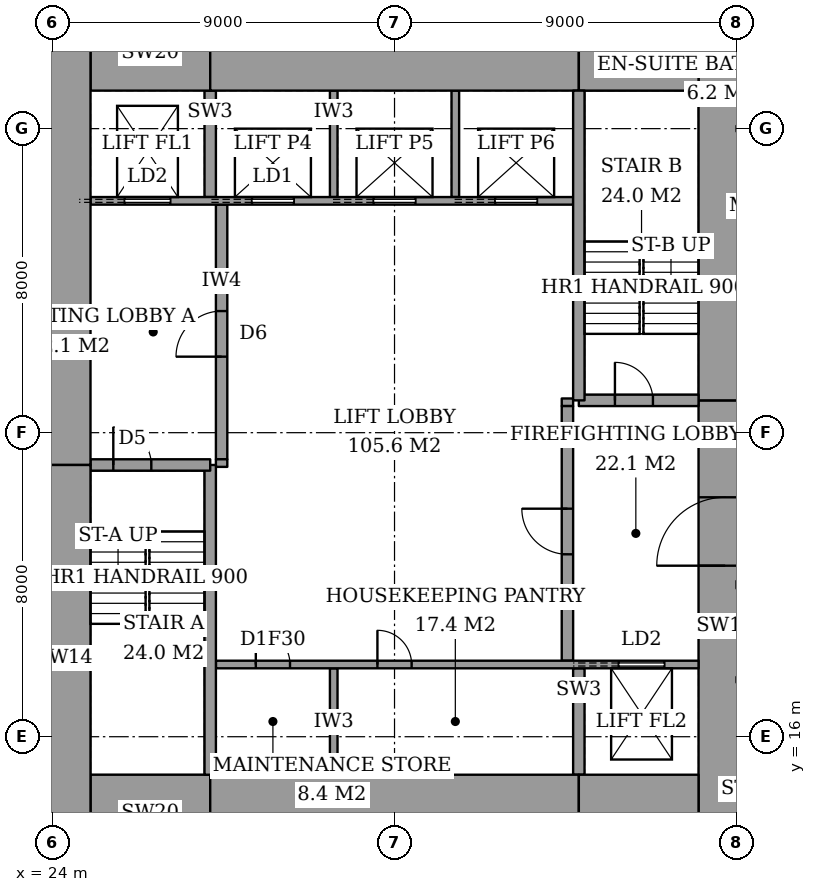
"""IFC4 building model, lengths in metres.
Left out: names, types, materials, properties, quantities, classifications, styles, units other than length and angle.
Written with IfcOpenShell. Run it as: python <this file> out.ifc"""

import sys

from ifc_helpers import new_model, si_unit, direction, frame, frame_2d, origin, place, context, subcontext, project, spatial, rectangle, extrude, element, fill, save


model = new_model("IFC4")
c1 = context("Model", 3, precision=1e-05, world=origin(), true_north=direction((0.0, 1.0)))
c2 = subcontext(c1, "Body", "Model", "MODEL_VIEW")
j1 = project(units=[si_unit("LENGTHUNIT", "METRE"), si_unit("PLANEANGLEUNIT", "RADIAN")], contexts=[c1])
p1 = place(None, origin())
s1 = spatial("IfcSite", under=j1, at=p1, CompositionType="ELEMENT")
p2 = place(p1, origin())
s2 = spatial("IfcBuilding", under=s1, at=p2, CompositionType="ELEMENT")
p3 = place(p2, frame((0.0, 0.0, 237.6)))
s3 = spatial("IfcBuildingStorey", under=s2, at=p3, CompositionType="ELEMENT", Elevation=237.6)
p4 = place(p3, frame((25.0, 14.0, 0.0), z_axis=(0.0, 0.0, 1.0), x_axis=(1.0, 0.0, 0.0)))
e1 = element("IfcWall", 1, at=p4, inside=s3, PredefinedType="SHEAR", context=c2, shape_type="SweptSolid", body=[
    extrude(rectangle(XDim=3.15, YDim=2.0, at=frame_2d((1.575, 0.0))), origin(), (0.0, 0.0, 1.0), 3.6),
])
p5 = place(p3, frame((28.15, 14.0, 0.0), z_axis=(0.0, 0.0, 1.0), x_axis=(1.0, 0.0, 0.0)))
e2 = element("IfcWall", 2, at=p5, inside=s3, PredefinedType="SHEAR", context=c2, shape_type="SweptSolid", body=[
    extrude(rectangle(XDim=9.7, YDim=2.0, at=frame_2d((4.85, 0.0))), origin(), (0.0, 0.0, 1.0), 3.6),
])
for number, where, z_axis, x_axis in (
    (3, (37.85, 14.0, 0.0), (0.0, 0.0, 1.0), (1.0, 0.0, 0.0)),
    (4, (25.0, 34.0, 0.0), (0.0, 0.0, 1.0), (1.0, 0.0, 0.0)),
):
    element("IfcWall", number, at=place(p3, frame(where, z_axis=z_axis, x_axis=x_axis)), inside=s3, PredefinedType="SHEAR", context=c2, shape_type="SweptSolid", body=[
        extrude(rectangle(XDim=3.15, YDim=2.0, at=frame_2d((1.575, 0.0))), origin(), (0.0, 0.0, 1.0), 3.6),
    ])
p6 = place(p3, frame((28.15, 34.0, 0.0), z_axis=(0.0, 0.0, 1.0), x_axis=(1.0, 0.0, 0.0)))
e5 = element("IfcWall", 5, at=p6, inside=s3, PredefinedType="SHEAR", context=c2, shape_type="SweptSolid", body=[
    extrude(rectangle(XDim=9.7, YDim=2.0, at=frame_2d((4.85, 0.0))), origin(), (0.0, 0.0, 1.0), 3.6),
])
p7 = place(p3, frame((37.85, 34.0, 0.0), z_axis=(0.0, 0.0, 1.0), x_axis=(1.0, 0.0, 0.0)))
e6 = element("IfcWall", 6, at=p7, inside=s3, PredefinedType="SHEAR", context=c2, shape_type="SweptSolid", body=[
    extrude(rectangle(XDim=3.15, YDim=2.0, at=frame_2d((1.575, 0.0))), origin(), (0.0, 0.0, 1.0), 3.6),
])
p8 = place(p3, frame((24.3, 13.0, 0.0), z_axis=(0.0, 0.0, 1.0), x_axis=(0.0, 1.0, 0.0)))
e7 = element("IfcWall", 7, at=p8, inside=s3, PredefinedType="SHEAR", context=c2, shape_type="SweptSolid", body=[
    extrude(rectangle(XDim=10.15, YDim=1.4, at=frame_2d((5.075, 0.0))), origin(), (0.0, 0.0, 1.0), 3.6),
])
p9 = place(p3, frame((24.3, 23.15, 0.0), z_axis=(0.0, 0.0, 1.0), x_axis=(0.0, 1.0, 0.0)))
e8 = element("IfcWall", 8, at=p9, inside=s3, PredefinedType="SHEAR", context=c2, shape_type="SweptSolid", body=[
    extrude(rectangle(XDim=11.85, YDim=1.4, at=frame_2d((5.925, 0.0))), origin(), (0.0, 0.0, 1.0), 3.6),
])
p10 = place(p3, frame((41.7, 13.0, 0.0), z_axis=(0.0, 0.0, 1.0), x_axis=(0.0, 1.0, 0.0)))
e9 = element("IfcWall", 9, at=p10, inside=s3, PredefinedType="SHEAR", context=c2, shape_type="SweptSolid", body=[
    extrude(rectangle(XDim=11.85, YDim=1.4, at=frame_2d((5.925, 0.0))), origin(), (0.0, 0.0, 1.0), 3.6),
])
p11 = place(p10, frame((7.5, 0.0, 0.0)))
e10 = element("IfcOpeningElement", 10, at=p11, cuts=e9, PredefinedType="OPENING", context=c2, shape_type="SweptSolid", body=[
    extrude(rectangle(XDim=1.8, YDim=2.4, at=frame_2d((0.9, 1.2))), frame((0.0, 0.71, 0.0), z_axis=(0.0, -1.0, 0.0), x_axis=(1.0, 0.0, 0.0)), (0.0, 0.0, 1.0), 1.42),
])
p12 = place(p3, frame((41.7, 24.85, 0.0), z_axis=(0.0, 0.0, 1.0), x_axis=(0.0, 1.0, 0.0)))
e11 = element("IfcWall", 11, at=p12, inside=s3, PredefinedType="SHEAR", context=c2, shape_type="SweptSolid", body=[
    extrude(rectangle(XDim=10.15, YDim=1.4, at=frame_2d((5.075, 0.0))), origin(), (0.0, 0.0, 1.0), 3.6),
])
p13 = place(p3, frame((28.15, 15.0, 0.0), z_axis=(0.0, 0.0, 1.0), x_axis=(0.0, 1.0, 0.0)))
e12 = element("IfcWall", 12, at=p13, inside=s3, PredefinedType="SHEAR", context=c2, shape_type="SweptSolid", body=[
    extrude(rectangle(XDim=8.15, YDim=0.3, at=frame_2d((4.075, 0.0))), origin(), (0.0, 0.0, 1.0), 3.6),
])
p14 = place(p3, frame((25.0, 23.15, 0.0), z_axis=(0.0, 0.0, 1.0), x_axis=(1.0, 0.0, 0.0)))
e13 = element("IfcWall", 13, at=p14, inside=s3, PredefinedType="SHEAR", context=c2, shape_type="SweptSolid", body=[
    extrude(rectangle(XDim=3.15, YDim=0.3, at=frame_2d((1.575, 0.0))), origin(), (0.0, 0.0, 1.0), 3.6),
])
p15 = place(p14, frame((0.6, 0.0, 0.0)))
e14 = element("IfcOpeningElement", 14, at=p15, cuts=e13, PredefinedType="OPENING", context=c2, shape_type="SweptSolid", body=[
    extrude(rectangle(XDim=1.0, YDim=2.1, at=frame_2d((0.5, 1.05))), frame((0.0, 0.16, 0.0), z_axis=(0.0, -1.0, 0.0), x_axis=(1.0, 0.0, 0.0)), (0.0, 0.0, 1.0), 0.32),
])
p16 = place(p3, frame((37.85, 24.85, 0.0), z_axis=(0.0, 0.0, 1.0), x_axis=(0.0, 1.0, 0.0)))
e15 = element("IfcWall", 15, at=p16, inside=s3, PredefinedType="SHEAR", context=c2, shape_type="SweptSolid", body=[
    extrude(rectangle(XDim=8.15, YDim=0.3, at=frame_2d((4.075, 0.0))), origin(), (0.0, 0.0, 1.0), 3.6),
])
p17 = place(p3, frame((37.85, 24.85, 0.0), z_axis=(0.0, 0.0, 1.0), x_axis=(1.0, 0.0, 0.0)))
e16 = element("IfcWall", 16, at=p17, inside=s3, PredefinedType="SHEAR", context=c2, shape_type="SweptSolid", body=[
    extrude(rectangle(XDim=3.15, YDim=0.3, at=frame_2d((1.575, 0.0))), origin(), (0.0, 0.0, 1.0), 3.6),
])
p18 = place(p17, frame((0.95, 0.0, 0.0)))
e17 = element("IfcOpeningElement", 17, at=p18, cuts=e16, PredefinedType="OPENING", context=c2, shape_type="SweptSolid", body=[
    extrude(rectangle(XDim=1.0, YDim=2.1, at=frame_2d((0.5, 1.05))), frame((0.0, 0.16, 0.0), z_axis=(0.0, -1.0, 0.0), x_axis=(1.0, 0.0, 0.0)), (0.0, 0.0, 1.0), 0.32),
])
p19 = place(p3, frame((28.45, 23.3, 0.0), z_axis=(0.0, 0.0, 1.0), x_axis=(0.0, 1.0, 0.0)))
e18 = element("IfcWall", 18, at=p19, inside=s3, PredefinedType="PARTITIONING", context=c2, shape_type="SweptSolid", body=[
    extrude(rectangle(XDim=6.7, YDim=0.3, at=frame_2d((3.35, 0.0))), origin(), (0.0, 0.0, 1.0), 3.6),
])
p20 = place(p19, frame((2.7, 0.0, 0.0)))
e19 = element("IfcOpeningElement", 19, at=p20, cuts=e18, PredefinedType="OPENING", context=c2, shape_type="SweptSolid", body=[
    extrude(rectangle(XDim=1.2, YDim=2.1, at=frame_2d((0.6, 1.05))), frame((0.0, 0.16, 0.0), z_axis=(0.0, -1.0, 0.0), x_axis=(1.0, 0.0, 0.0)), (0.0, 0.0, 1.0), 0.32),
])
p21 = place(p3, frame((37.55, 18.0, 0.0), z_axis=(0.0, 0.0, 1.0), x_axis=(0.0, 1.0, 0.0)))
e20 = element("IfcWall", 20, at=p21, inside=s3, PredefinedType="PARTITIONING", context=c2, shape_type="SweptSolid", body=[
    extrude(rectangle(XDim=6.7, YDim=0.3, at=frame_2d((3.35, 0.0))), origin(), (0.0, 0.0, 1.0), 3.6),
])
p22 = place(p21, frame((2.8, 0.0, 0.0)))
e21 = element("IfcOpeningElement", 21, at=p22, cuts=e20, PredefinedType="OPENING", context=c2, shape_type="SweptSolid", body=[
    extrude(rectangle(XDim=1.2, YDim=2.1, at=frame_2d((0.6, 1.05))), frame((0.0, 0.16, 0.0), z_axis=(0.0, -1.0, 0.0), x_axis=(1.0, 0.0, 0.0)), (0.0, 0.0, 1.0), 0.32),
])
p23 = place(p3, frame((28.3, 17.9, 0.0), z_axis=(0.0, 0.0, 1.0), x_axis=(1.0, 0.0, 0.0)))
e22 = element("IfcWall", 22, at=p23, inside=s3, PredefinedType="PARTITIONING", context=c2, shape_type="SweptSolid", body=[
    extrude(rectangle(XDim=12.7, YDim=0.2, at=frame_2d((6.35, 0.0))), origin(), (0.0, 0.0, 1.0), 3.6),
])
p24 = place(p23, frame((1.05, 0.0, 0.0)))
e23 = element("IfcOpeningElement", 23, at=p24, cuts=e22, PredefinedType="OPENING", context=c2, shape_type="SweptSolid", body=[
    extrude(rectangle(XDim=0.9, YDim=2.1, at=frame_2d((0.45, 1.05))), frame((0.0, 0.11, 0.0), z_axis=(0.0, -1.0, 0.0), x_axis=(1.0, 0.0, 0.0)), (0.0, 0.0, 1.0), 0.22),
])
p25 = place(p23, frame((4.25, 0.0, 0.0)))
e24 = element("IfcOpeningElement", 24, at=p25, cuts=e22, PredefinedType="OPENING", context=c2, shape_type="SweptSolid", body=[
    extrude(rectangle(XDim=0.9, YDim=2.1, at=frame_2d((0.45, 1.05))), frame((0.0, 0.11, 0.0), z_axis=(0.0, -1.0, 0.0), x_axis=(1.0, 0.0, 0.0)), (0.0, 0.0, 1.0), 0.22),
])
p26 = place(p23, frame((10.6, 0.0, 0.0)))
e25 = element("IfcOpeningElement", 25, at=p26, cuts=e22, PredefinedType="OPENING", context=c2, shape_type="SweptSolid", body=[
    extrude(rectangle(XDim=1.2, YDim=2.1, at=frame_2d((0.6, 1.05))), frame((0.0, 0.11, 0.0), z_axis=(0.0, -1.0, 0.0), x_axis=(1.0, 0.0, 0.0)), (0.0, 0.0, 1.0), 0.22),
])
p27 = place(p3, frame((25.0, 30.1, 0.0), z_axis=(0.0, 0.0, 1.0), x_axis=(1.0, 0.0, 0.0)))
e26 = element("IfcWall", 26, at=p27, inside=s3, PredefinedType="PARTITIONING", context=c2, shape_type="SweptSolid", body=[
    extrude(rectangle(XDim=12.7, YDim=0.2, at=frame_2d((6.35, 0.0))), origin(), (0.0, 0.0, 1.0), 3.6),
])
p28 = place(p27, frame((4.25, 0.0, 0.0)))
e27 = element("IfcOpeningElement", 27, at=p28, cuts=e26, PredefinedType="OPENING", context=c2, shape_type="SweptSolid", body=[
    extrude(rectangle(XDim=1.1, YDim=2.1, at=frame_2d((0.55, 1.05))), frame((0.0, 0.11, 0.0), z_axis=(0.0, -1.0, 0.0), x_axis=(1.0, 0.0, 0.0)), (0.0, 0.0, 1.0), 0.22),
])
p29 = place(p27, frame((7.45, 0.0, 0.0)))
e28 = element("IfcOpeningElement", 28, at=p29, cuts=e26, PredefinedType="OPENING", context=c2, shape_type="SweptSolid", body=[
    extrude(rectangle(XDim=1.1, YDim=2.1, at=frame_2d((0.55, 1.05))), frame((0.0, 0.11, 0.0), z_axis=(0.0, -1.0, 0.0), x_axis=(1.0, 0.0, 0.0)), (0.0, 0.0, 1.0), 0.22),
])
p30 = place(p27, frame((10.65, 0.0, 0.0)))
e29 = element("IfcOpeningElement", 29, at=p30, cuts=e26, PredefinedType="OPENING", context=c2, shape_type="SweptSolid", body=[
    extrude(rectangle(XDim=1.1, YDim=2.1, at=frame_2d((0.55, 1.05))), frame((0.0, 0.11, 0.0), z_axis=(0.0, -1.0, 0.0), x_axis=(1.0, 0.0, 0.0)), (0.0, 0.0, 1.0), 0.22),
])
p31 = place(p27, frame((0.9, 0.0, 0.0)))
e30 = element("IfcOpeningElement", 30, at=p31, cuts=e26, PredefinedType="OPENING", context=c2, shape_type="SweptSolid", body=[
    extrude(rectangle(XDim=1.2, YDim=2.1, at=frame_2d((0.6, 1.05))), frame((0.0, 0.11, 0.0), z_axis=(0.0, -1.0, 0.0), x_axis=(1.0, 0.0, 0.0)), (0.0, 0.0, 1.0), 0.22),
])
p32 = place(p3, frame((31.4, 15.0, 0.0), z_axis=(0.0, 0.0, 1.0), x_axis=(0.0, 1.0, 0.0)))
e31 = element("IfcWall", 31, at=p32, inside=s3, PredefinedType="PARTITIONING", context=c2, shape_type="SweptSolid", body=[
    extrude(rectangle(XDim=2.8, YDim=0.2, at=frame_2d((1.4, 0.0))), origin(), (0.0, 0.0, 1.0), 3.6),
])
p33 = place(p3, frame((37.85, 15.0, 0.0), z_axis=(0.0, 0.0, 1.0), x_axis=(0.0, 1.0, 0.0)))
e32 = element("IfcWall", 32, at=p33, inside=s3, PredefinedType="SHEAR", context=c2, shape_type="SweptSolid", body=[
    extrude(rectangle(XDim=2.8, YDim=0.3, at=frame_2d((1.4, 0.0))), origin(), (0.0, 0.0, 1.0), 3.6),
])
for number, where, z_axis, x_axis in (
    (33, (31.4, 30.2, 0.0), (0.0, 0.0, 1.0), (0.0, 1.0, 0.0)),
    (34, (34.6, 30.2, 0.0), (0.0, 0.0, 1.0), (0.0, 1.0, 0.0)),
):
    element("IfcWall", number, at=place(p3, frame(where, z_axis=z_axis, x_axis=x_axis)), inside=s3, PredefinedType="PARTITIONING", context=c2, shape_type="SweptSolid", body=[
        extrude(rectangle(XDim=2.8, YDim=0.2, at=frame_2d((1.4, 0.0))), origin(), (0.0, 0.0, 1.0), 3.6),
    ])
p34 = place(p3, frame((28.15, 30.2, 0.0), z_axis=(0.0, 0.0, 1.0), x_axis=(0.0, 1.0, 0.0)))
e35 = element("IfcWall", 35, at=p34, inside=s3, PredefinedType="SHEAR", context=c2, shape_type="SweptSolid", body=[
    extrude(rectangle(XDim=2.8, YDim=0.3, at=frame_2d((1.4, 0.0))), origin(), (0.0, 0.0, 1.0), 3.6),
])
for number, where, z_axis, x_axis in (
    (36, (28.3, 23.2, 0.0), (0.0, 0.0, 1.0), (1.0, 0.0, 0.0)),
    (37, (37.4, 24.8, 0.0), (0.0, 0.0, 1.0), (1.0, 0.0, 0.0)),
):
    element("IfcWall", number, at=place(p3, frame(where, z_axis=z_axis, x_axis=x_axis)), inside=s3, PredefinedType="PARTITIONING", context=c2, shape_type="SweptSolid", body=[
        extrude(rectangle(XDim=0.3, YDim=0.2, at=frame_2d((0.15, 0.0))), origin(), (0.0, 0.0, 1.0), 3.6),
    ])
p35 = place(p15, origin())
e38 = element("IfcDoor", 38, at=p35, inside=s3, OperationType="SINGLE_SWING_RIGHT", PredefinedType="DOOR", context=c2, shape_type="SweptSolid", body=[
    extrude(rectangle(XDim=1.0, YDim=2.1, at=frame_2d((0.5, 1.05))), frame((0.0, 0.025, 0.0), z_axis=(0.0, -1.0, 0.0), x_axis=(1.0, 0.0, 0.0)), (0.0, 0.0, 1.0), 0.05),
])
fill(e14, e38)
p36 = place(p18, origin())
e39 = element("IfcDoor", 39, at=p36, inside=s3, OperationType="SINGLE_SWING_RIGHT", PredefinedType="DOOR", context=c2, shape_type="SweptSolid", body=[
    extrude(rectangle(XDim=1.0, YDim=2.1, at=frame_2d((0.5, 1.05))), frame((0.0, 0.025, 0.0), z_axis=(0.0, -1.0, 0.0), x_axis=(1.0, 0.0, 0.0)), (0.0, 0.0, 1.0), 0.05),
])
fill(e17, e39)
p37 = place(p20, origin())
e40 = element("IfcDoor", 40, at=p37, inside=s3, OperationType="SINGLE_SWING_RIGHT", PredefinedType="DOOR", context=c2, shape_type="SweptSolid", body=[
    extrude(rectangle(XDim=1.2, YDim=2.1, at=frame_2d((0.6, 1.05))), frame((0.0, 0.025, 0.0), z_axis=(0.0, -1.0, 0.0), x_axis=(1.0, 0.0, 0.0)), (0.0, 0.0, 1.0), 0.05),
])
fill(e19, e40)
p38 = place(p22, origin())
e41 = element("IfcDoor", 41, at=p38, inside=s3, OperationType="SINGLE_SWING_LEFT", PredefinedType="DOOR", context=c2, shape_type="SweptSolid", body=[
    extrude(rectangle(XDim=1.2, YDim=2.1, at=frame_2d((0.6, 1.05))), frame((0.0, 0.025, 0.0), z_axis=(0.0, -1.0, 0.0), x_axis=(1.0, 0.0, 0.0)), (0.0, 0.0, 1.0), 0.05),
])
fill(e21, e41)
p39 = place(p11, origin())
e42 = element("IfcDoor", 42, at=p39, inside=s3, OperationType="DOUBLE_DOOR_DOUBLE_SWING", PredefinedType="DOOR", context=c2, shape_type="SweptSolid", body=[
    extrude(rectangle(XDim=1.8, YDim=2.4, at=frame_2d((0.9, 1.2))), frame((0.0, 0.025, 0.0), z_axis=(0.0, -1.0, 0.0), x_axis=(1.0, 0.0, 0.0)), (0.0, 0.0, 1.0), 0.05),
])
fill(e10, e42)
p40 = place(p24, origin())
e43 = element("IfcDoor", 43, at=p40, inside=s3, OperationType="SINGLE_SWING_RIGHT", PredefinedType="DOOR", context=c2, shape_type="SweptSolid", body=[
    extrude(rectangle(XDim=0.9, YDim=2.1, at=frame_2d((0.45, 1.05))), frame((0.0, 0.025, 0.0), z_axis=(0.0, -1.0, 0.0), x_axis=(1.0, 0.0, 0.0)), (0.0, 0.0, 1.0), 0.05),
])
fill(e23, e43)
p41 = place(p25, origin())
e44 = element("IfcDoor", 44, at=p41, inside=s3, OperationType="SINGLE_SWING_RIGHT", PredefinedType="DOOR", context=c2, shape_type="SweptSolid", body=[
    extrude(rectangle(XDim=0.9, YDim=2.1, at=frame_2d((0.45, 1.05))), frame((0.0, 0.025, 0.0), z_axis=(0.0, -1.0, 0.0), x_axis=(1.0, 0.0, 0.0)), (0.0, 0.0, 1.0), 0.05),
])
fill(e24, e44)
p42 = place(p28, origin())
e45 = element("IfcDoor", 45, at=p42, inside=s3, OperationType="SLIDING_TO_LEFT", PredefinedType="DOOR", context=c2, shape_type="SweptSolid", body=[
    extrude(rectangle(XDim=1.1, YDim=2.1, at=frame_2d((0.55, 1.05))), frame((0.0, 0.025, 0.0), z_axis=(0.0, -1.0, 0.0), x_axis=(1.0, 0.0, 0.0)), (0.0, 0.0, 1.0), 0.05),
])
fill(e27, e45)
p43 = place(p29, origin())
e46 = element("IfcDoor", 46, at=p43, inside=s3, OperationType="SLIDING_TO_LEFT", PredefinedType="DOOR", context=c2, shape_type="SweptSolid", body=[
    extrude(rectangle(XDim=1.1, YDim=2.1, at=frame_2d((0.55, 1.05))), frame((0.0, 0.025, 0.0), z_axis=(0.0, -1.0, 0.0), x_axis=(1.0, 0.0, 0.0)), (0.0, 0.0, 1.0), 0.05),
])
fill(e28, e46)
p44 = place(p30, origin())
e47 = element("IfcDoor", 47, at=p44, inside=s3, OperationType="SLIDING_TO_LEFT", PredefinedType="DOOR", context=c2, shape_type="SweptSolid", body=[
    extrude(rectangle(XDim=1.1, YDim=2.1, at=frame_2d((0.55, 1.05))), frame((0.0, 0.025, 0.0), z_axis=(0.0, -1.0, 0.0), x_axis=(1.0, 0.0, 0.0)), (0.0, 0.0, 1.0), 0.05),
])
fill(e29, e47)
p45 = place(p31, origin())
e48 = element("IfcDoor", 48, at=p45, inside=s3, OperationType="SLIDING_TO_LEFT", PredefinedType="DOOR", context=c2, shape_type="SweptSolid", body=[
    extrude(rectangle(XDim=1.2, YDim=2.1, at=frame_2d((0.6, 1.05))), frame((0.0, 0.025, 0.0), z_axis=(0.0, -1.0, 0.0), x_axis=(1.0, 0.0, 0.0)), (0.0, 0.0, 1.0), 0.05),
])
fill(e30, e48)
p46 = place(p26, origin())
e49 = element("IfcDoor", 49, at=p46, inside=s3, OperationType="SLIDING_TO_LEFT", PredefinedType="DOOR", context=c2, shape_type="SweptSolid", body=[
    extrude(rectangle(XDim=1.2, YDim=2.1, at=frame_2d((0.6, 1.05))), frame((0.0, 0.025, 0.0), z_axis=(0.0, -1.0, 0.0), x_axis=(1.0, 0.0, 0.0)), (0.0, 0.0, 1.0), 0.05),
])
fill(e25, e49)
save(model, sys.argv[1])
